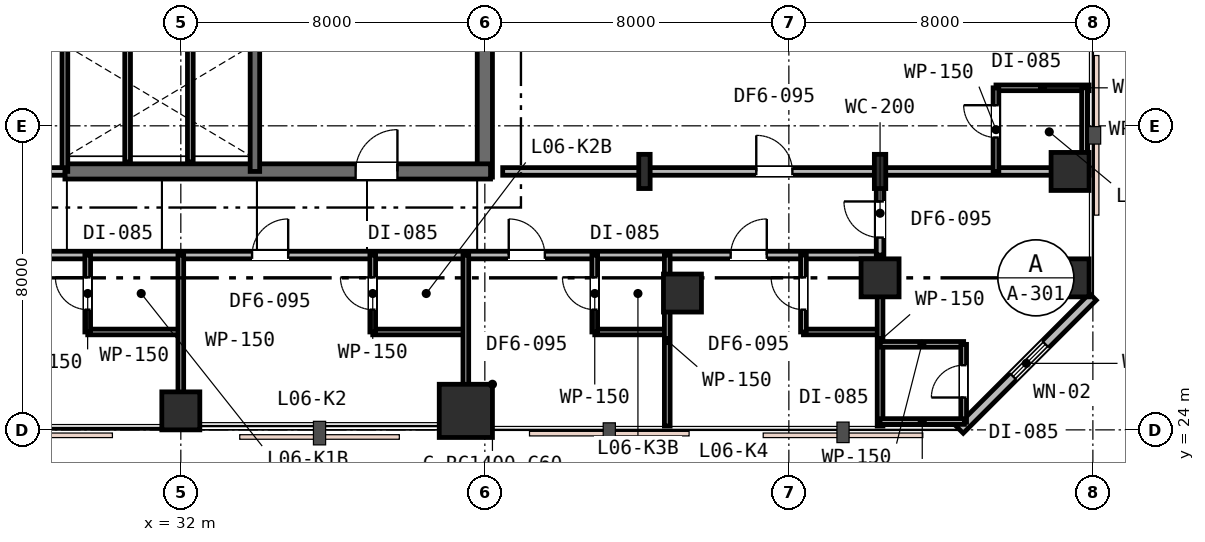
"""IFC4 building model, lengths in metres.
Left out: names, types, materials, properties, quantities, classifications, styles, units other than length and angle.
Written with IfcOpenShell. Run it as: python <this file> out.ifc"""

import sys

from ifc_helpers import new_model, si_unit, direction, frame, frame_2d, origin, origin_2d, place, context, subcontext, project, spatial, rectangle, i_section, extrude, element, fill, save


model = new_model("IFC4")
c1 = context("Model", 3, precision=1e-05, world=origin(), true_north=direction((0.0, 1.0)))
c2 = subcontext(c1, "Body", "Model", "MODEL_VIEW")
j1 = project(units=[si_unit("LENGTHUNIT", "METRE"), si_unit("PLANEANGLEUNIT", "RADIAN")], contexts=[c1])
p1 = place(None, origin())
s1 = spatial("IfcSite", under=j1, at=p1, CompositionType="ELEMENT")
p2 = place(p1, origin())
s2 = spatial("IfcBuilding", under=s1, at=p2, CompositionType="ELEMENT")
p3 = place(p2, frame((0.0, 0.0, 29.4)))
s3 = spatial("IfcBuildingStorey", under=s2, at=p3, CompositionType="ELEMENT", Elevation=29.4)
p4 = place(p3, frame((40.0, 30.65, 0.0), z_axis=(0.0, 0.0, 1.0), x_axis=(0.0, 1.0, 0.0)))
e1 = element("IfcWall", 1, at=p4, inside=s3, PredefinedType="SHEAR", context=c2, shape_type="SweptSolid", body=[
    extrude(rectangle(XDim=12.3, YDim=0.4, at=frame_2d((6.15, 0.0))), origin(), (0.0, 0.0, 1.0), 3.6),
])
p5 = place(p3, frame((28.95, 30.8, 0.0), z_axis=(0.0, 0.0, 1.0), x_axis=(1.0, 0.0, 0.0)))
e2 = element("IfcWall", 2, at=p5, inside=s3, PredefinedType="SHEAR", context=c2, shape_type="SweptSolid", body=[
    extrude(rectangle(XDim=11.2, YDim=0.4, at=frame_2d((5.6, 0.0))), origin(), (0.0, 0.0, 1.0), 3.6),
])
p6 = place(p5, frame((7.65, 0.0, 0.0)))
e3 = element("IfcOpeningElement", 3, at=p6, cuts=e2, PredefinedType="OPENING", context=c2, shape_type="SweptSolid", body=[
    extrude(rectangle(XDim=1.1, YDim=2.15, at=frame_2d((0.55, 1.075))), frame((0.0, 0.21, 0.0), z_axis=(0.0, -1.0, 0.0), x_axis=(1.0, 0.0, 0.0)), (0.0, 0.0, 1.0), 0.42),
])
p7 = place(p3, frame((33.95, 30.8, 0.0), z_axis=(0.0, 0.0, 1.0), x_axis=(0.0, 1.0, 0.0)))
e4 = element("IfcWall", 4, at=p7, inside=s3, PredefinedType="SHEAR", context=c2, shape_type="SweptSolid", body=[
    extrude(rectangle(XDim=6.45, YDim=0.25, at=frame_2d((3.225, 0.0))), origin(), (0.0, 0.0, 1.0), 3.6),
])
p8 = place(p3, frame((32.0, 24.5, 0.0), z_axis=(0.0, 0.0, 1.0), x_axis=(1.0, 0.0, 0.0)))
e5 = element("IfcColumn", 5, at=p8, inside=s3, PredefinedType="COLUMN", context=c2, shape_type="SweptSolid", body=[
    extrude(rectangle(XDim=1.0, YDim=1.0, at=origin_2d()), origin(), (0.0, 0.0, 1.0), 3.6),
])
p9 = place(p3, frame((39.5, 24.5, 0.0), z_axis=(0.0, 0.0, 1.0), x_axis=(1.0, 0.0, 0.0)))
e6 = element("IfcColumn", 6, at=p9, inside=s3, PredefinedType="COLUMN", context=c2, shape_type="SweptSolid", body=[
    extrude(rectangle(XDim=1.4, YDim=1.4, at=origin_2d()), origin(), (0.0, 0.0, 1.0), 3.6),
])
for number, where, z_axis, x_axis in (
    (7, (45.2, 27.6, 0.0), (0.0, 0.0, 1.0), (1.0, 0.0, 0.0)),
    (8, (50.4, 28.0, 0.0), (0.0, 0.0, 1.0), (1.0, 0.0, 0.0)),
    (9, (55.4, 28.0, 0.0), (0.0, 0.0, 1.0), (1.0, 0.0, 0.0)),
    (10, (55.4, 30.8, 0.0), (0.0, 0.0, 1.0), (1.0, 0.0, 0.0)),
):
    element("IfcColumn", number, at=place(p3, frame(where, z_axis=z_axis, x_axis=x_axis)), inside=s3, PredefinedType="COLUMN", context=c2, shape_type="SweptSolid", body=[
        extrude(rectangle(XDim=1.0, YDim=1.0, at=origin_2d()), origin(), (0.0, 0.0, 1.0), 3.6),
    ])
for number, where, z_axis, x_axis in (
    (11, (44.2, 30.8, 0.0), (0.0, 0.0, 1.0), (1.0, 0.0, 0.0)),
    (12, (50.4, 30.8, 0.0), (0.0, 0.0, 1.0), (1.0, 0.0, 0.0)),
):
    element("IfcColumn", number, at=place(p3, frame(where, z_axis=z_axis, x_axis=x_axis)), inside=s3, PredefinedType="COLUMN", context=c2, shape_type="SweptSolid", body=[
        extrude(i_section(OverallWidth=0.3, OverallDepth=0.9, WebThickness=0.018, FlangeThickness=0.035, FilletRadius=0.03, at=origin_2d()), origin(), (0.0, 0.0, 1.0), 3.6),
    ])
p10 = place(p3, frame((52.5, 24.0, 0.0), z_axis=(0.0, 0.0, 1.0), x_axis=(0.707106781187, 0.707106781187, 0.0)))
e13 = element("IfcWall", 13, at=p10, inside=s3, PredefinedType="STANDARD", context=c2, shape_type="SweptSolid", body=[
    extrude(rectangle(XDim=4.95, YDim=0.25, at=frame_2d((2.475, 0.0))), origin(), (0.0, 0.0, 1.0), 3.33),
])
p11 = place(p10, frame((1.985, 0.0, 0.85)))
e14 = element("IfcOpeningElement", 14, at=p11, cuts=e13, PredefinedType="OPENING", context=c2, shape_type="SweptSolid", body=[
    extrude(rectangle(XDim=1.2, YDim=1.6, at=frame_2d((0.6, 0.8))), frame((0.0, 0.135, 0.0), z_axis=(0.0, -1.0, 0.0), x_axis=(1.0, 0.0, 0.0)), (0.0, 0.0, 1.0), 0.27),
])
p12 = place(p3, frame((28.95, 30.8, 0.0), z_axis=(0.0, 0.0, 1.0), x_axis=(0.0, 1.0, 0.0)))
e15 = element("IfcWall", 15, at=p12, inside=s3, PredefinedType="PLUMBINGWALL", context=c2, shape_type="SweptSolid", body=[
    extrude(rectangle(XDim=3.45, YDim=0.15, at=frame_2d((1.725, 0.0))), origin(), (0.0, 0.0, 1.0), 3.33),
])
p13 = place(p3, frame((27.05, 30.8, 0.0), z_axis=(0.0, 0.0, 1.0), x_axis=(1.0, 0.0, 0.0)))
e16 = element("IfcWall", 16, at=p13, inside=s3, PredefinedType="PARTITIONING", context=c2, shape_type="SweptSolid", body=[
    extrude(rectangle(XDim=1.9, YDim=0.2, at=frame_2d((0.95, 0.0))), origin(), (0.0, 0.0, 1.0), 3.33),
])
p14 = place(p13, frame((0.4, 0.0, 0.0)))
e17 = element("IfcOpeningElement", 17, at=p14, cuts=e16, PredefinedType="OPENING", context=c2, shape_type="SweptSolid", body=[
    extrude(rectangle(XDim=1.1, YDim=2.15, at=frame_2d((0.55, 1.075))), frame((0.0, 0.11, 0.0), z_axis=(0.0, -1.0, 0.0), x_axis=(1.0, 0.0, 0.0)), (0.0, 0.0, 1.0), 0.22),
])
for number, where, z_axis, x_axis in (
    (18, (30.6, 31.05, 0.0), (0.0, 0.0, 1.0), (0.0, 1.0, 0.0)),
    (19, (32.25, 31.05, 0.0), (0.0, 0.0, 1.0), (0.0, 1.0, 0.0)),
):
    element("IfcWall", number, at=place(p3, frame(where, z_axis=z_axis, x_axis=x_axis)), inside=s3, PredefinedType="PLUMBINGWALL", context=c2, shape_type="SweptSolid", body=[
        extrude(rectangle(XDim=3.1, YDim=0.15, at=frame_2d((1.55, 0.0))), origin(), (0.0, 0.0, 1.0), 3.33),
    ])
p15 = place(p3, frame((13.8, 28.6, 0.0), z_axis=(0.0, 0.0, 1.0), x_axis=(1.0, 0.0, 0.0)))
e20 = element("IfcWall", 20, at=p15, inside=s3, PredefinedType="PARTITIONING", context=c2, shape_type="SweptSolid", body=[
    extrude(rectangle(XDim=36.6, YDim=0.2, at=frame_2d((18.3, 0.0))), origin(), (0.0, 0.0, 1.0), 2.68),
])
p16 = place(p15, frame((12.3, 0.0, 0.0)))
e21 = element("IfcOpeningElement", 21, at=p16, cuts=e20, PredefinedType="OPENING", context=c2, shape_type="SweptSolid", body=[
    extrude(rectangle(XDim=0.95, YDim=2.15, at=frame_2d((0.475, 1.075))), frame((0.0, 0.11, 0.0), z_axis=(0.0, -1.0, 0.0), x_axis=(1.0, 0.0, 0.0)), (0.0, 0.0, 1.0), 0.22),
])
p17 = place(p15, frame((20.075, 0.0, 0.0)))
e22 = element("IfcOpeningElement", 22, at=p17, cuts=e20, PredefinedType="OPENING", context=c2, shape_type="SweptSolid", body=[
    extrude(rectangle(XDim=0.95, YDim=2.15, at=frame_2d((0.475, 1.075))), frame((0.0, 0.11, 0.0), z_axis=(0.0, -1.0, 0.0), x_axis=(1.0, 0.0, 0.0)), (0.0, 0.0, 1.0), 0.22),
])
p18 = place(p15, frame((26.829, 0.0, 0.0)))
e23 = element("IfcOpeningElement", 23, at=p18, cuts=e20, PredefinedType="OPENING", context=c2, shape_type="SweptSolid", body=[
    extrude(rectangle(XDim=0.95, YDim=2.15, at=frame_2d((0.475, 1.075))), frame((0.0, 0.11, 0.0), z_axis=(0.0, -1.0, 0.0), x_axis=(1.0, 0.0, 0.0)), (0.0, 0.0, 1.0), 0.22),
])
p19 = place(p15, frame((32.669, 0.0, 0.0)))
e24 = element("IfcOpeningElement", 24, at=p19, cuts=e20, PredefinedType="OPENING", context=c2, shape_type="SweptSolid", body=[
    extrude(rectangle(XDim=0.95, YDim=2.15, at=frame_2d((0.475, 1.075))), frame((0.0, 0.11, 0.0), z_axis=(0.0, -1.0, 0.0), x_axis=(1.0, 0.0, 0.0)), (0.0, 0.0, 1.0), 0.22),
])
p20 = place(p3, frame((29.55, 26.576, 0.0), z_axis=(0.0, 0.0, 1.0), x_axis=(1.0, 0.0, 0.0)))
e25 = element("IfcWall", 25, at=p20, inside=s3, PredefinedType="PARTITIONING", context=c2, shape_type="SweptSolid", body=[
    extrude(rectangle(XDim=2.45, YDim=0.15, at=frame_2d((1.225, 0.0))), origin(), (0.0, 0.0, 1.0), 3.33),
])
p21 = place(p3, frame((29.55, 26.576, 0.0), z_axis=(0.0, 0.0, 1.0), x_axis=(0.0, 1.0, 0.0)))
e26 = element("IfcWall", 26, at=p21, inside=s3, PredefinedType="PARTITIONING", context=c2, shape_type="SweptSolid", body=[
    extrude(rectangle(XDim=2.024, YDim=0.15, at=frame_2d((1.012, 0.0))), origin(), (0.0, 0.0, 1.0), 3.33),
])
p22 = place(p21, frame((0.587, 0.0, 0.0)))
e27 = element("IfcOpeningElement", 27, at=p22, cuts=e26, PredefinedType="OPENING", context=c2, shape_type="SweptSolid", body=[
    extrude(rectangle(XDim=0.85, YDim=2.15, at=frame_2d((0.425, 1.075))), frame((0.0, 0.085, 0.0), z_axis=(0.0, -1.0, 0.0), x_axis=(1.0, 0.0, 0.0)), (0.0, 0.0, 1.0), 0.17),
])
p23 = place(p3, frame((32.0, 28.6, 0.0), z_axis=(0.0, 0.0, 1.0), x_axis=(0.0, -1.0, 0.0)))
e28 = element("IfcWall", 28, at=p23, inside=s3, PredefinedType="PARTITIONING", context=c2, shape_type="SweptSolid", body=[
    extrude(rectangle(XDim=4.5, YDim=0.15, at=frame_2d((2.25, 0.0))), origin(), (0.0, 0.0, 1.0), 2.87),
])
p24 = place(p3, frame((37.05, 26.576, 0.0), z_axis=(0.0, 0.0, 1.0), x_axis=(1.0, 0.0, 0.0)))
e29 = element("IfcWall", 29, at=p24, inside=s3, PredefinedType="PARTITIONING", context=c2, shape_type="SweptSolid", body=[
    extrude(rectangle(XDim=2.45, YDim=0.15, at=frame_2d((1.225, 0.0))), origin(), (0.0, 0.0, 1.0), 2.68),
])
p25 = place(p3, frame((37.05, 26.576, 0.0), z_axis=(0.0, 0.0, 1.0), x_axis=(0.0, 1.0, 0.0)))
e30 = element("IfcWall", 30, at=p25, inside=s3, PredefinedType="PARTITIONING", context=c2, shape_type="SweptSolid", body=[
    extrude(rectangle(XDim=2.024, YDim=0.15, at=frame_2d((1.012, 0.0))), origin(), (0.0, 0.0, 1.0), 2.92),
])
p26 = place(p25, frame((0.587, 0.0, 0.0)))
e31 = element("IfcOpeningElement", 31, at=p26, cuts=e30, PredefinedType="OPENING", context=c2, shape_type="SweptSolid", body=[
    extrude(rectangle(XDim=0.85, YDim=2.15, at=frame_2d((0.425, 1.075))), frame((0.0, 0.085, 0.0), z_axis=(0.0, -1.0, 0.0), x_axis=(1.0, 0.0, 0.0)), (0.0, 0.0, 1.0), 0.17),
])
p27 = place(p3, frame((39.5, 28.6, 0.0), z_axis=(0.0, 0.0, 1.0), x_axis=(0.0, -1.0, 0.0)))
e32 = element("IfcWall", 32, at=p27, inside=s3, PredefinedType="PARTITIONING", context=c2, shape_type="SweptSolid", body=[
    extrude(rectangle(XDim=4.5, YDim=0.15, at=frame_2d((2.25, 0.0))), origin(), (0.0, 0.0, 1.0), 2.68),
])
p28 = place(p3, frame((42.892, 26.576, 0.0), z_axis=(0.0, 0.0, 1.0), x_axis=(1.0, 0.0, 0.0)))
e33 = element("IfcWall", 33, at=p28, inside=s3, PredefinedType="PARTITIONING", context=c2, shape_type="SweptSolid", body=[
    extrude(rectangle(XDim=1.908, YDim=0.15, at=frame_2d((0.954, 0.0))), origin(), (0.0, 0.0, 1.0), 3.33),
])
p29 = place(p3, frame((42.892, 26.576, 0.0), z_axis=(0.0, 0.0, 1.0), x_axis=(0.0, 1.0, 0.0)))
e34 = element("IfcWall", 34, at=p29, inside=s3, PredefinedType="PARTITIONING", context=c2, shape_type="SweptSolid", body=[
    extrude(rectangle(XDim=2.024, YDim=0.15, at=frame_2d((1.012, 0.0))), origin(), (0.0, 0.0, 1.0), 3.33),
])
p30 = place(p29, frame((0.587, 0.0, 0.0)))
e35 = element("IfcOpeningElement", 35, at=p30, cuts=e34, PredefinedType="OPENING", context=c2, shape_type="SweptSolid", body=[
    extrude(rectangle(XDim=0.85, YDim=2.15, at=frame_2d((0.425, 1.075))), frame((0.0, 0.085, 0.0), z_axis=(0.0, -1.0, 0.0), x_axis=(1.0, 0.0, 0.0)), (0.0, 0.0, 1.0), 0.17),
])
p31 = place(p3, frame((44.8, 28.6, 0.0), z_axis=(0.0, 0.0, 1.0), x_axis=(0.0, -1.0, 0.0)))
e36 = element("IfcWall", 36, at=p31, inside=s3, PredefinedType="PARTITIONING", context=c2, shape_type="SweptSolid", body=[
    extrude(rectangle(XDim=4.5, YDim=0.15, at=frame_2d((2.25, 0.0))), origin(), (0.0, 0.0, 1.0), 2.68),
])
p32 = place(p3, frame((48.384, 26.576, 0.0), z_axis=(0.0, 0.0, 1.0), x_axis=(1.0, 0.0, 0.0)))
e37 = element("IfcWall", 37, at=p32, inside=s3, PredefinedType="PARTITIONING", context=c2, shape_type="SweptSolid", body=[
    extrude(rectangle(XDim=2.016, YDim=0.15, at=frame_2d((1.008, 0.0))), origin(), (0.0, 0.0, 1.0), 3.33),
])
p33 = place(p3, frame((48.384, 26.576, 0.0), z_axis=(0.0, 0.0, 1.0), x_axis=(0.0, 1.0, 0.0)))
e38 = element("IfcWall", 38, at=p33, inside=s3, PredefinedType="PARTITIONING", context=c2, shape_type="SweptSolid", body=[
    extrude(rectangle(XDim=2.024, YDim=0.15, at=frame_2d((1.012, 0.0))), origin(), (0.0, 0.0, 1.0), 3.33),
])
p34 = place(p33, frame((0.587, 0.0, 0.0)))
e39 = element("IfcOpeningElement", 39, at=p34, cuts=e38, PredefinedType="OPENING", context=c2, shape_type="SweptSolid", body=[
    extrude(rectangle(XDim=0.85, YDim=2.15, at=frame_2d((0.425, 1.075))), frame((0.0, 0.085, 0.0), z_axis=(0.0, -1.0, 0.0), x_axis=(1.0, 0.0, 0.0)), (0.0, 0.0, 1.0), 0.17),
])
p35 = place(p3, frame((50.4, 28.6, 0.0), z_axis=(0.0, 0.0, 1.0), x_axis=(0.0, -1.0, 0.0)))
e40 = element("IfcWall", 40, at=p35, inside=s3, PredefinedType="PARTITIONING", context=c2, shape_type="SweptSolid", body=[
    extrude(rectangle(XDim=4.5, YDim=0.15, at=frame_2d((2.25, 0.0))), origin(), (0.0, 0.0, 1.0), 2.68),
])
p36 = place(p3, frame((40.47, 30.8, 0.0), z_axis=(0.0, 0.0, 1.0), x_axis=(1.0, 0.0, 0.0)))
e41 = element("IfcWall", 41, at=p36, inside=s3, PredefinedType="PARTITIONING", context=c2, shape_type="SweptSolid", body=[
    extrude(rectangle(XDim=15.43, YDim=0.2, at=frame_2d((7.715, 0.0))), origin(), (0.0, 0.0, 1.0), 2.68),
])
p37 = place(p36, frame((6.673, 0.0, 0.0)))
e42 = element("IfcOpeningElement", 42, at=p37, cuts=e41, PredefinedType="OPENING", context=c2, shape_type="SweptSolid", body=[
    extrude(rectangle(XDim=0.95, YDim=2.15, at=frame_2d((0.475, 1.075))), frame((0.0, 0.11, 0.0), z_axis=(0.0, -1.0, 0.0), x_axis=(1.0, 0.0, 0.0)), (0.0, 0.0, 1.0), 0.22),
])
p38 = place(p3, frame((53.45, 33.0, 0.0), z_axis=(0.0, 0.0, 1.0), x_axis=(1.0, 0.0, 0.0)))
e43 = element("IfcWall", 43, at=p38, inside=s3, PredefinedType="PARTITIONING", context=c2, shape_type="SweptSolid", body=[
    extrude(rectangle(XDim=2.45, YDim=0.15, at=frame_2d((1.225, 0.0))), origin(), (0.0, 0.0, 1.0), 2.87),
])
p39 = place(p3, frame((53.45, 30.8, 0.0), z_axis=(0.0, 0.0, 1.0), x_axis=(0.0, 1.0, 0.0)))
e44 = element("IfcWall", 44, at=p39, inside=s3, PredefinedType="PARTITIONING", context=c2, shape_type="SweptSolid", body=[
    extrude(rectangle(XDim=2.2, YDim=0.15, at=frame_2d((1.1, 0.0))), origin(), (0.0, 0.0, 1.0), 2.68),
])
p40 = place(p39, frame((0.892, 0.0, 0.0)))
e45 = element("IfcOpeningElement", 45, at=p40, cuts=e44, PredefinedType="OPENING", context=c2, shape_type="SweptSolid", body=[
    extrude(rectangle(XDim=0.85, YDim=2.15, at=frame_2d((0.425, 1.075))), frame((0.0, 0.085, 0.0), z_axis=(0.0, -1.0, 0.0), x_axis=(1.0, 0.0, 0.0)), (0.0, 0.0, 1.0), 0.17),
])
p41 = place(p3, frame((55.78, 33.0, 0.0), z_axis=(0.0, 0.0, 1.0), x_axis=(0.0, -1.0, 0.0)))
e46 = element("IfcWall", 46, at=p41, inside=s3, PredefinedType="PARTITIONING", context=c2, shape_type="SweptSolid", body=[
    extrude(rectangle(XDim=2.2, YDim=0.15, at=frame_2d((1.1, 0.0))), origin(), (0.0, 0.0, 1.0), 2.68),
])
p42 = place(p3, frame((50.4, 28.6, 0.0), z_axis=(0.0, 0.0, 1.0), x_axis=(0.0, 1.0, 0.0)))
e47 = element("IfcWall", 47, at=p42, inside=s3, PredefinedType="PARTITIONING", context=c2, shape_type="SweptSolid", body=[
    extrude(rectangle(XDim=2.2, YDim=0.2, at=frame_2d((1.1, 0.0))), origin(), (0.0, 0.0, 1.0), 2.68),
])
p43 = place(p42, frame((0.46, 0.0, 0.0)))
e48 = element("IfcOpeningElement", 48, at=p43, cuts=e47, PredefinedType="OPENING", context=c2, shape_type="SweptSolid", body=[
    extrude(rectangle(XDim=0.95, YDim=2.15, at=frame_2d((0.475, 1.075))), frame((0.0, 0.11, 0.0), z_axis=(0.0, -1.0, 0.0), x_axis=(1.0, 0.0, 0.0)), (0.0, 0.0, 1.0), 0.22),
])
p44 = place(p3, frame((50.4, 26.25, 0.0), z_axis=(0.0, 0.0, 1.0), x_axis=(1.0, 0.0, 0.0)))
e49 = element("IfcWall", 49, at=p44, inside=s3, PredefinedType="PARTITIONING", context=c2, shape_type="SweptSolid", body=[
    extrude(rectangle(XDim=2.2, YDim=0.15, at=frame_2d((1.1, 0.0))), origin(), (0.0, 0.0, 1.0), 3.33),
])
p45 = place(p3, frame((52.6, 24.2, 0.0), z_axis=(0.0, 0.0, 1.0), x_axis=(0.0, 1.0, 0.0)))
e50 = element("IfcWall", 50, at=p45, inside=s3, PredefinedType="PARTITIONING", context=c2, shape_type="SweptSolid", body=[
    extrude(rectangle(XDim=2.05, YDim=0.15, at=frame_2d((1.025, 0.0))), origin(), (0.0, 0.0, 1.0), 3.33),
])
p46 = place(p45, frame((0.651, 0.0, 0.0)))
e51 = element("IfcOpeningElement", 51, at=p46, cuts=e50, PredefinedType="OPENING", context=c2, shape_type="SweptSolid", body=[
    extrude(rectangle(XDim=0.85, YDim=2.15, at=frame_2d((0.425, 1.075))), frame((0.0, 0.085, 0.0), z_axis=(0.0, -1.0, 0.0), x_axis=(1.0, 0.0, 0.0)), (0.0, 0.0, 1.0), 0.17),
])
p47 = place(p3, frame((52.62, 24.22, 0.0), z_axis=(0.0, 0.0, 1.0), x_axis=(-1.0, 0.0, 0.0)))
e52 = element("IfcWall", 52, at=p47, inside=s3, PredefinedType="PARTITIONING", context=c2, shape_type="SweptSolid", body=[
    extrude(rectangle(XDim=2.22, YDim=0.15, at=frame_2d((1.11, 0.0))), origin(), (0.0, 0.0, 1.0), 3.33),
])
p48 = place(p11, origin())
e53 = element("IfcWindow", 53, at=p48, inside=s3, PartitioningType="SINGLE_PANEL", PredefinedType="WINDOW", context=c2, shape_type="SweptSolid", body=[
    extrude(rectangle(XDim=1.2, YDim=1.6, at=frame_2d((0.6, 0.8))), frame((0.0, 0.03, 0.0), z_axis=(0.0, -1.0, 0.0), x_axis=(1.0, 0.0, 0.0)), (0.0, 0.0, 1.0), 0.06),
])
fill(e14, e53)
p49 = place(p6, origin())
e54 = element("IfcDoor", 54, at=p49, inside=s3, OperationType="SINGLE_SWING_RIGHT", PredefinedType="DOOR", context=c2, shape_type="SweptSolid", body=[
    extrude(rectangle(XDim=1.1, YDim=2.15, at=frame_2d((0.55, 1.075))), frame((0.0, 0.025, 0.0), z_axis=(0.0, -1.0, 0.0), x_axis=(1.0, 0.0, 0.0)), (0.0, 0.0, 1.0), 0.05),
])
fill(e3, e54)
p50 = place(p22, origin())
e55 = element("IfcDoor", 55, at=p50, inside=s3, OperationType="SINGLE_SWING_RIGHT", PredefinedType="DOOR", context=c2, shape_type="SweptSolid", body=[
    extrude(rectangle(XDim=0.85, YDim=2.15, at=frame_2d((0.425, 1.075))), frame((0.0, 0.025, 0.0), z_axis=(0.0, -1.0, 0.0), x_axis=(1.0, 0.0, 0.0)), (0.0, 0.0, 1.0), 0.05),
])
fill(e27, e55)
p51 = place(p17, origin())
e56 = element("IfcDoor", 56, at=p51, inside=s3, OperationType="SINGLE_SWING_RIGHT", PredefinedType="DOOR", context=c2, shape_type="SweptSolid", body=[
    extrude(rectangle(XDim=0.95, YDim=2.15, at=frame_2d((0.475, 1.075))), frame((0.0, 0.025, 0.0), z_axis=(0.0, -1.0, 0.0), x_axis=(1.0, 0.0, 0.0)), (0.0, 0.0, 1.0), 0.05),
])
fill(e22, e56)
p52 = place(p26, origin())
e57 = element("IfcDoor", 57, at=p52, inside=s3, OperationType="SINGLE_SWING_RIGHT", PredefinedType="DOOR", context=c2, shape_type="SweptSolid", body=[
    extrude(rectangle(XDim=0.85, YDim=2.15, at=frame_2d((0.425, 1.075))), frame((0.0, 0.025, 0.0), z_axis=(0.0, -1.0, 0.0), x_axis=(1.0, 0.0, 0.0)), (0.0, 0.0, 1.0), 0.05),
])
fill(e31, e57)
p53 = place(p18, origin())
e58 = element("IfcDoor", 58, at=p53, inside=s3, OperationType="SINGLE_SWING_LEFT", PredefinedType="DOOR", context=c2, shape_type="SweptSolid", body=[
    extrude(rectangle(XDim=0.95, YDim=2.15, at=frame_2d((0.475, 1.075))), frame((0.0, 0.025, 0.0), z_axis=(0.0, -1.0, 0.0), x_axis=(1.0, 0.0, 0.0)), (0.0, 0.0, 1.0), 0.05),
])
fill(e23, e58)
p54 = place(p30, origin())
e59 = element("IfcDoor", 59, at=p54, inside=s3, OperationType="SINGLE_SWING_RIGHT", PredefinedType="DOOR", context=c2, shape_type="SweptSolid", body=[
    extrude(rectangle(XDim=0.85, YDim=2.15, at=frame_2d((0.425, 1.075))), frame((0.0, 0.025, 0.0), z_axis=(0.0, -1.0, 0.0), x_axis=(1.0, 0.0, 0.0)), (0.0, 0.0, 1.0), 0.05),
])
fill(e35, e59)
p55 = place(p19, origin())
e60 = element("IfcDoor", 60, at=p55, inside=s3, OperationType="SINGLE_SWING_RIGHT", PredefinedType="DOOR", context=c2, shape_type="SweptSolid", body=[
    extrude(rectangle(XDim=0.95, YDim=2.15, at=frame_2d((0.475, 1.075))), frame((0.0, 0.025, 0.0), z_axis=(0.0, -1.0, 0.0), x_axis=(1.0, 0.0, 0.0)), (0.0, 0.0, 1.0), 0.05),
])
fill(e24, e60)
p56 = place(p34, origin())
e61 = element("IfcDoor", 61, at=p56, inside=s3, OperationType="SINGLE_SWING_RIGHT", PredefinedType="DOOR", context=c2, shape_type="SweptSolid", body=[
    extrude(rectangle(XDim=0.85, YDim=2.15, at=frame_2d((0.425, 1.075))), frame((0.0, 0.025, 0.0), z_axis=(0.0, -1.0, 0.0), x_axis=(1.0, 0.0, 0.0)), (0.0, 0.0, 1.0), 0.05),
])
fill(e39, e61)
p57 = place(p37, origin())
e62 = element("IfcDoor", 62, at=p57, inside=s3, OperationType="SINGLE_SWING_LEFT", PredefinedType="DOOR", context=c2, shape_type="SweptSolid", body=[
    extrude(rectangle(XDim=0.95, YDim=2.15, at=frame_2d((0.475, 1.075))), frame((0.0, 0.025, 0.0), z_axis=(0.0, -1.0, 0.0), x_axis=(1.0, 0.0, 0.0)), (0.0, 0.0, 1.0), 0.05),
])
fill(e42, e62)
p58 = place(p40, origin())
e63 = element("IfcDoor", 63, at=p58, inside=s3, OperationType="SINGLE_SWING_RIGHT", PredefinedType="DOOR", context=c2, shape_type="SweptSolid", body=[
    extrude(rectangle(XDim=0.85, YDim=2.15, at=frame_2d((0.425, 1.075))), frame((0.0, 0.025, 0.0), z_axis=(0.0, -1.0, 0.0), x_axis=(1.0, 0.0, 0.0)), (0.0, 0.0, 1.0), 0.05),
])
fill(e45, e63)
p59 = place(p43, origin())
e64 = element("IfcDoor", 64, at=p59, inside=s3, OperationType="SINGLE_SWING_RIGHT", PredefinedType="DOOR", context=c2, shape_type="SweptSolid", body=[
    extrude(rectangle(XDim=0.95, YDim=2.15, at=frame_2d((0.475, 1.075))), frame((0.0, 0.025, 0.0), z_axis=(0.0, -1.0, 0.0), x_axis=(1.0, 0.0, 0.0)), (0.0, 0.0, 1.0), 0.05),
])
fill(e48, e64)
p60 = place(p46, origin())
e65 = element("IfcDoor", 65, at=p60, inside=s3, OperationType="SINGLE_SWING_LEFT", PredefinedType="DOOR", context=c2, shape_type="SweptSolid", body=[
    extrude(rectangle(XDim=0.85, YDim=2.15, at=frame_2d((0.425, 1.075))), frame((0.0, 0.025, 0.0), z_axis=(0.0, -1.0, 0.0), x_axis=(1.0, 0.0, 0.0)), (0.0, 0.0, 1.0), 0.05),
])
fill(e51, e65)
save(model, sys.argv[1])
